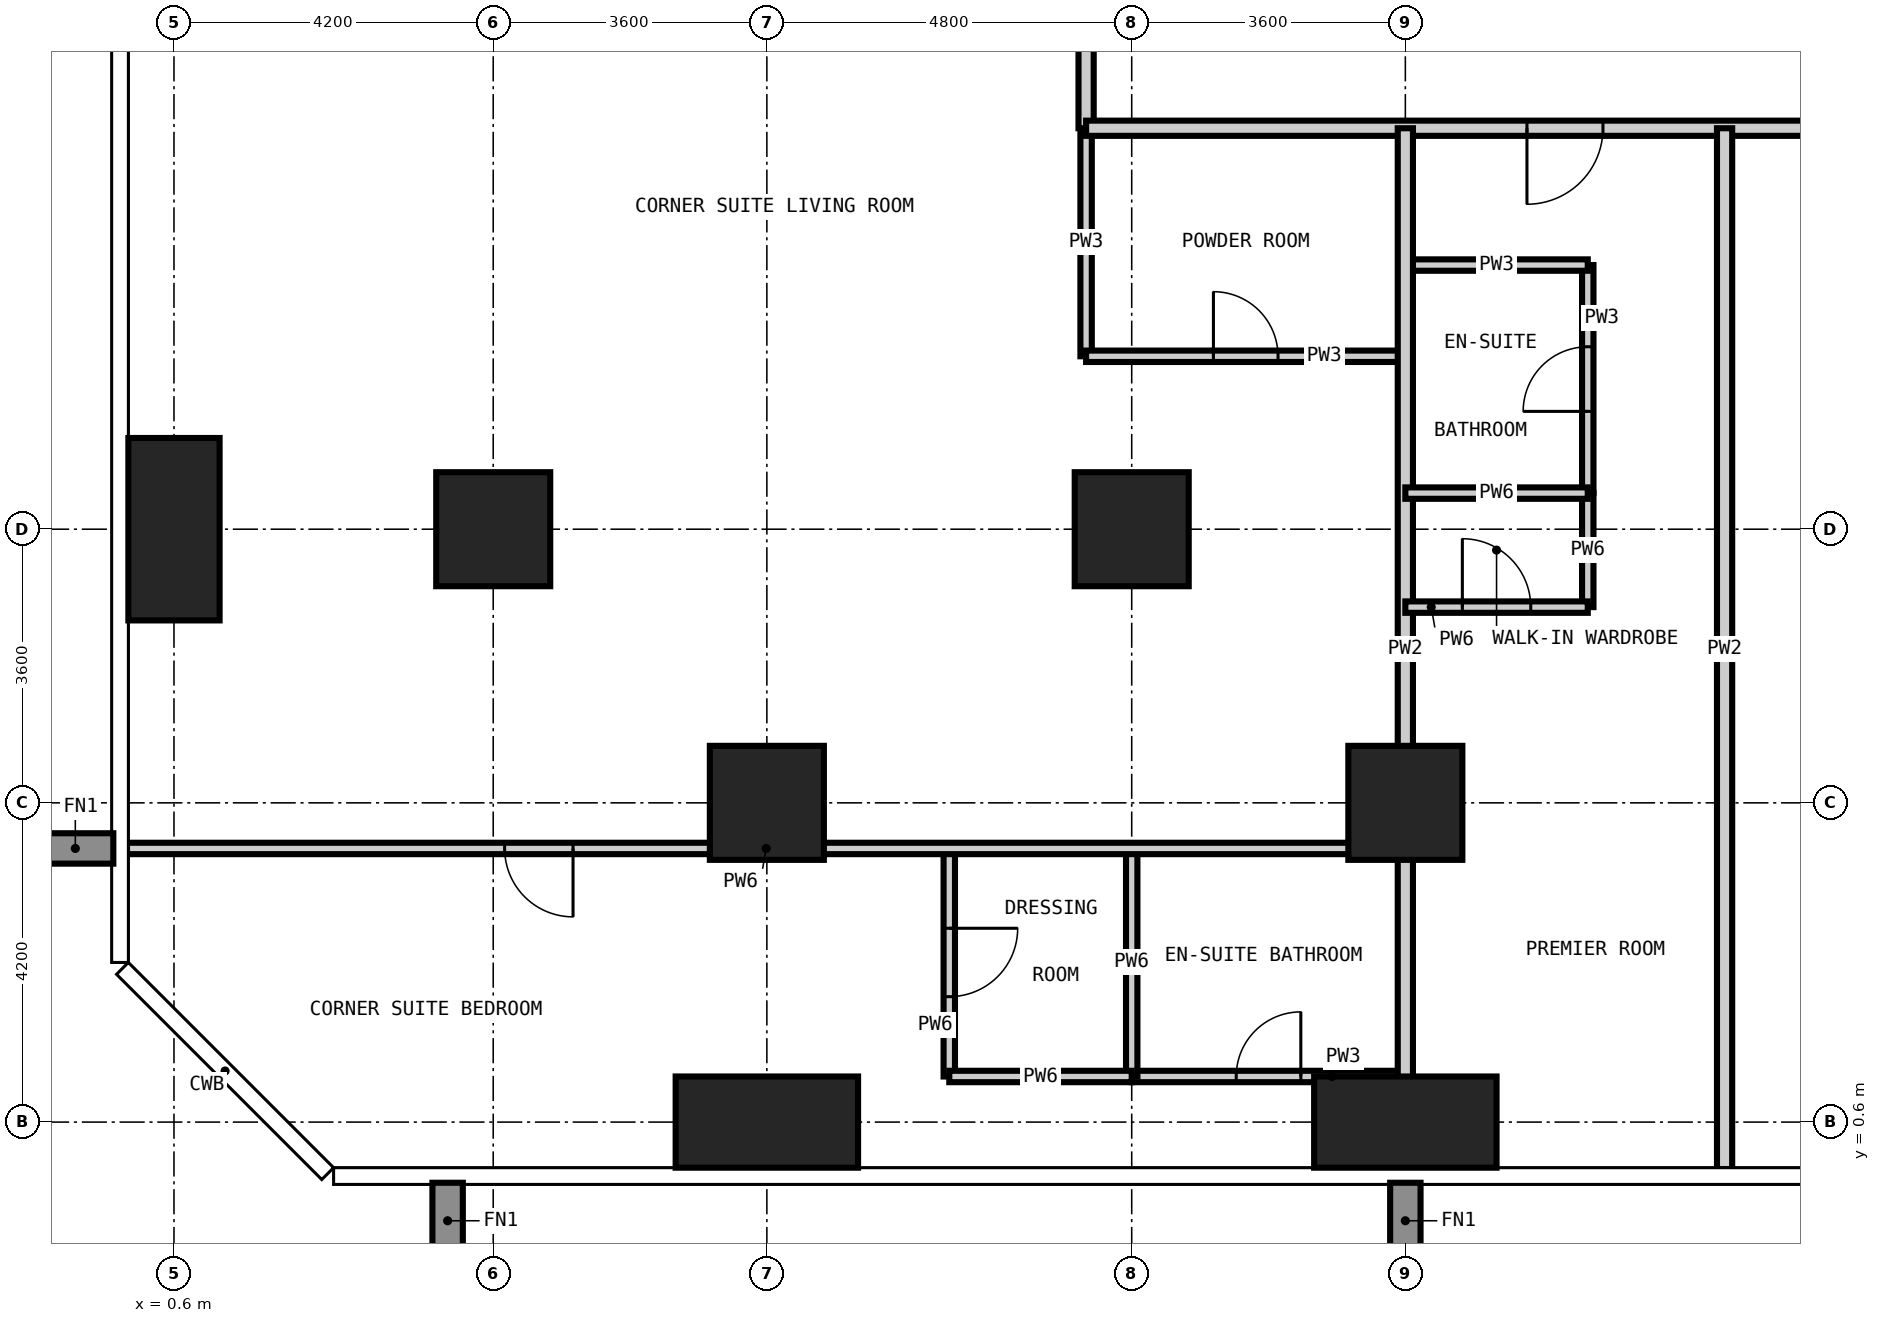
"""IFC4 building model, lengths in metres.
Left out: names, types, materials, properties, quantities, classifications, styles, units other than length and angle.
Written with IfcOpenShell. Run it as: python <this file> out.ifc"""

import sys

from ifc_helpers import new_model, si_unit, direction, frame, frame_2d, origin, origin_2d, place, context, subcontext, project, spatial, rectangle, extrude, element, fill, save


model = new_model("IFC4")
c1 = context("Model", 3, precision=1e-05, world=origin(), true_north=direction((0.0, 1.0)))
c2 = subcontext(c1, "Body", "Model", "MODEL_VIEW")
j1 = project(units=[si_unit("LENGTHUNIT", "METRE"), si_unit("PLANEANGLEUNIT", "RADIAN")], contexts=[c1])
p1 = place(None, origin())
s1 = spatial("IfcSite", under=j1, at=p1, CompositionType="ELEMENT")
p2 = place(p1, origin())
s2 = spatial("IfcBuilding", under=s1, at=p2, CompositionType="ELEMENT")
p3 = place(p2, frame((0.0, 0.0, 122.4)))
s3 = spatial("IfcBuildingStorey", under=s2, at=p3, CompositionType="ELEMENT", Elevation=122.4)
p4 = place(p3, frame((0.6, 8.4, -0.35), z_axis=(0.0, 0.0, 1.0), x_axis=(1.0, 0.0, 0.0)))
e1 = element("IfcColumn", 1, at=p4, inside=s3, PredefinedType="COLUMN", context=c2, shape_type="SweptSolid", body=[
    extrude(rectangle(XDim=1.2, YDim=2.4, at=origin_2d()), origin(), (0.0, 0.0, 1.0), 3.6),
])
p5 = place(p3, frame((4.8, 8.4, -0.35), z_axis=(0.0, 0.0, 1.0), x_axis=(1.0, 0.0, 0.0)))
e2 = element("IfcColumn", 2, at=p5, inside=s3, PredefinedType="COLUMN", context=c2, shape_type="SweptSolid", body=[
    extrude(rectangle(XDim=1.5, YDim=1.5, at=origin_2d()), origin(), (0.0, 0.0, 1.0), 3.6),
])
p6 = place(p3, frame((8.4, 0.6, -0.35), z_axis=(0.0, 0.0, 1.0), x_axis=(1.0, 0.0, 0.0)))
e3 = element("IfcColumn", 3, at=p6, inside=s3, PredefinedType="COLUMN", context=c2, shape_type="SweptSolid", body=[
    extrude(rectangle(XDim=2.4, YDim=1.2, at=origin_2d()), origin(), (0.0, 0.0, 1.0), 3.6),
])
for number, where, z_axis, x_axis in (
    (4, (8.4, 4.8, -0.35), (0.0, 0.0, 1.0), (1.0, 0.0, 0.0)),
    (5, (13.2, 8.4, -0.35), (0.0, 0.0, 1.0), (1.0, 0.0, 0.0)),
):
    element("IfcColumn", number, at=place(p3, frame(where, z_axis=z_axis, x_axis=x_axis)), inside=s3, PredefinedType="COLUMN", context=c2, shape_type="SweptSolid", body=[
        extrude(rectangle(XDim=1.5, YDim=1.5, at=origin_2d()), origin(), (0.0, 0.0, 1.0), 3.6),
    ])
p7 = place(p3, frame((16.8, 0.6, -0.35), z_axis=(0.0, 0.0, 1.0), x_axis=(1.0, 0.0, 0.0)))
e6 = element("IfcColumn", 6, at=p7, inside=s3, PredefinedType="COLUMN", context=c2, shape_type="SweptSolid", body=[
    extrude(rectangle(XDim=2.4, YDim=1.2, at=origin_2d()), origin(), (0.0, 0.0, 1.0), 3.6),
])
p8 = place(p3, frame((16.8, 4.8, -0.35), z_axis=(0.0, 0.0, 1.0), x_axis=(1.0, 0.0, 0.0)))
e7 = element("IfcColumn", 7, at=p8, inside=s3, PredefinedType="COLUMN", context=c2, shape_type="SweptSolid", body=[
    extrude(rectangle(XDim=1.5, YDim=1.5, at=origin_2d()), origin(), (0.0, 0.0, 1.0), 3.6),
])
p9 = place(p3, frame((12.6, 10.675, 0.0), z_axis=(0.0, 0.0, 1.0), x_axis=(0.0, 1.0, 0.0)))
e8 = element("IfcWall", 8, at=p9, inside=s3, PredefinedType="PARTITIONING", context=c2, shape_type="SweptSolid", body=[
    extrude(rectangle(XDim=3.0, YDim=0.15, at=frame_2d((1.5, 0.0))), origin(), (0.0, 0.0, 1.0), 3.25),
])
p10 = place(p3, frame((19.2, 8.875, 0.0), z_axis=(0.0, 0.0, 1.0), x_axis=(0.0, 1.0, 0.0)))
e9 = element("IfcWall", 9, at=p10, inside=s3, PredefinedType="PARTITIONING", context=c2, shape_type="SweptSolid", body=[
    extrude(rectangle(XDim=3.0, YDim=0.15, at=frame_2d((1.5, 0.0))), origin(), (0.0, 0.0, 1.0), 3.25),
])
p11 = place(p10, frame((1.075, 0.0, 0.0)))
e10 = element("IfcOpeningElement", 10, at=p11, cuts=e9, PredefinedType="OPENING", context=c2, shape_type="SweptSolid", body=[
    extrude(rectangle(XDim=0.85, YDim=2.1, at=frame_2d((0.425, 1.05))), frame((0.0, 0.085, 0.0), z_axis=(0.0, -1.0, 0.0), x_axis=(1.0, 0.0, 0.0)), (0.0, 0.0, 1.0), 0.17),
])
p12 = place(p3, frame((13.2, 1.2, 0.0), z_axis=(0.0, 0.0, 1.0), x_axis=(1.0, 0.0, 0.0)))
e11 = element("IfcWall", 11, at=p12, inside=s3, PredefinedType="PARTITIONING", context=c2, shape_type="SweptSolid", body=[
    extrude(rectangle(XDim=3.6, YDim=0.15, at=frame_2d((1.8, 0.0))), origin(), (0.0, 0.0, 1.0), 3.25),
])
p13 = place(p12, frame((1.375, 0.0, 0.0)))
e12 = element("IfcOpeningElement", 12, at=p13, cuts=e11, PredefinedType="OPENING", context=c2, shape_type="SweptSolid", body=[
    extrude(rectangle(XDim=0.85, YDim=2.1, at=frame_2d((0.425, 1.05))), frame((0.0, 0.085, 0.0), z_axis=(0.0, -1.0, 0.0), x_axis=(1.0, 0.0, 0.0)), (0.0, 0.0, 1.0), 0.17),
])
p14 = place(p3, frame((12.6, 10.675, 0.0), z_axis=(0.0, 0.0, 1.0), x_axis=(1.0, 0.0, 0.0)))
e13 = element("IfcWall", 13, at=p14, inside=s3, PredefinedType="PARTITIONING", context=c2, shape_type="SweptSolid", body=[
    extrude(rectangle(XDim=4.2, YDim=0.15, at=frame_2d((2.1, 0.0))), origin(), (0.0, 0.0, 1.0), 3.25),
])
p15 = place(p14, frame((1.675, 0.0, 0.0)))
e14 = element("IfcOpeningElement", 14, at=p15, cuts=e13, PredefinedType="OPENING", context=c2, shape_type="SweptSolid", body=[
    extrude(rectangle(XDim=0.85, YDim=2.1, at=frame_2d((0.425, 1.05))), frame((0.0, 0.085, 0.0), z_axis=(0.0, -1.0, 0.0), x_axis=(1.0, 0.0, 0.0)), (0.0, 0.0, 1.0), 0.17),
])
p16 = place(p3, frame((16.8, 11.875, 0.0), z_axis=(0.0, 0.0, 1.0), x_axis=(1.0, 0.0, 0.0)))
e15 = element("IfcWall", 15, at=p16, inside=s3, PredefinedType="PARTITIONING", context=c2, shape_type="SweptSolid", body=[
    extrude(rectangle(XDim=2.4, YDim=0.15, at=frame_2d((1.2, 0.0))), origin(), (0.0, 0.0, 1.0), 3.25),
])
p17 = place(p3, frame((12.6, 13.675, 0.0), z_axis=(0.0, 0.0, 1.0), x_axis=(0.0, 1.0, 0.0)))
e16 = element("IfcWall", 16, at=p17, inside=s3, PredefinedType="PARTITIONING", context=c2, shape_type="SweptSolid", body=[
    extrude(rectangle(XDim=32.05, YDim=0.2, at=frame_2d((16.025, 0.0))), origin(), (0.0, 0.0, 1.0), 3.25),
])
p18 = place(p17, frame((6.825, 0.0, 0.0)))
e17 = element("IfcOpeningElement", 17, at=p18, cuts=e16, PredefinedType="OPENING", context=c2, shape_type="SweptSolid", body=[
    extrude(rectangle(XDim=1.0, YDim=2.2, at=frame_2d((0.5, 1.1))), frame((0.0, 0.11, 0.0), z_axis=(0.0, -1.0, 0.0), x_axis=(1.0, 0.0, 0.0)), (0.0, 0.0, 1.0), 0.22),
])
p19 = place(p17, frame((15.225, 0.0, 0.0)))
e18 = element("IfcOpeningElement", 18, at=p19, cuts=e16, PredefinedType="OPENING", context=c2, shape_type="SweptSolid", body=[
    extrude(rectangle(XDim=1.0, YDim=2.2, at=frame_2d((0.5, 1.1))), frame((0.0, 0.11, 0.0), z_axis=(0.0, -1.0, 0.0), x_axis=(1.0, 0.0, 0.0)), (0.0, 0.0, 1.0), 0.22),
])
p20 = place(p17, frame((23.625, 0.0, 0.0)))
e19 = element("IfcOpeningElement", 19, at=p20, cuts=e16, PredefinedType="OPENING", context=c2, shape_type="SweptSolid", body=[
    extrude(rectangle(XDim=1.0, YDim=2.2, at=frame_2d((0.5, 1.1))), frame((0.0, 0.11, 0.0), z_axis=(0.0, -1.0, 0.0), x_axis=(1.0, 0.0, 0.0)), (0.0, 0.0, 1.0), 0.22),
])
p21 = place(p17, frame((1.063, 0.0, 0.0)))
e20 = element("IfcOpeningElement", 20, at=p21, cuts=e16, PredefinedType="OPENING", context=c2, shape_type="SweptSolid", body=[
    extrude(rectangle(XDim=1.0, YDim=2.2, at=frame_2d((0.5, 1.1))), frame((0.0, 0.11, 0.0), z_axis=(0.0, -1.0, 0.0), x_axis=(1.0, 0.0, 0.0)), (0.0, 0.0, 1.0), 0.22),
])
p22 = place(p17, frame((29.687, 0.0, 0.0)))
e21 = element("IfcOpeningElement", 21, at=p22, cuts=e16, PredefinedType="OPENING", context=c2, shape_type="SweptSolid", body=[
    extrude(rectangle(XDim=1.0, YDim=2.2, at=frame_2d((0.5, 1.1))), frame((0.0, 0.11, 0.0), z_axis=(0.0, -1.0, 0.0), x_axis=(1.0, 0.0, 0.0)), (0.0, 0.0, 1.0), 0.22),
])
p23 = place(p3, frame((44.525, 13.675, 0.0), z_axis=(0.0, 0.0, 1.0), x_axis=(-1.0, 0.0, 0.0)))
e22 = element("IfcWall", 22, at=p23, inside=s3, PredefinedType="PARTITIONING", context=c2, shape_type="SweptSolid", body=[
    extrude(rectangle(XDim=31.925, YDim=0.2, at=frame_2d((15.962, 0.0))), origin(), (0.0, 0.0, 1.0), 3.25),
])
p24 = place(p23, frame((25.125, 0.0, 0.0)))
e23 = element("IfcOpeningElement", 23, at=p24, cuts=e22, PredefinedType="OPENING", context=c2, shape_type="SweptSolid", body=[
    extrude(rectangle(XDim=1.0, YDim=2.2, at=frame_2d((0.5, 1.1))), frame((0.0, 0.11, 0.0), z_axis=(0.0, -1.0, 0.0), x_axis=(1.0, 0.0, 0.0)), (0.0, 0.0, 1.0), 0.22),
])
p25 = place(p23, frame((18.825, 0.0, 0.0)))
e24 = element("IfcOpeningElement", 24, at=p25, cuts=e22, PredefinedType="OPENING", context=c2, shape_type="SweptSolid", body=[
    extrude(rectangle(XDim=1.0, YDim=2.2, at=frame_2d((0.5, 1.1))), frame((0.0, 0.11, 0.0), z_axis=(0.0, -1.0, 0.0), x_axis=(1.0, 0.0, 0.0)), (0.0, 0.0, 1.0), 0.22),
])
p26 = place(p23, frame((10.425, 0.0, 0.0)))
e25 = element("IfcOpeningElement", 25, at=p26, cuts=e22, PredefinedType="OPENING", context=c2, shape_type="SweptSolid", body=[
    extrude(rectangle(XDim=1.0, YDim=2.2, at=frame_2d((0.5, 1.1))), frame((0.0, 0.11, 0.0), z_axis=(0.0, -1.0, 0.0), x_axis=(1.0, 0.0, 0.0)), (0.0, 0.0, 1.0), 0.22),
])
p27 = place(p23, frame((4.125, 0.0, 0.0)))
e26 = element("IfcOpeningElement", 26, at=p27, cuts=e22, PredefinedType="OPENING", context=c2, shape_type="SweptSolid", body=[
    extrude(rectangle(XDim=1.0, YDim=2.2, at=frame_2d((0.5, 1.1))), frame((0.0, 0.11, 0.0), z_axis=(0.0, -1.0, 0.0), x_axis=(1.0, 0.0, 0.0)), (0.0, 0.0, 1.0), 0.22),
])
for number, where, z_axis, x_axis in (
    (27, (16.8, -0.018, 0.0), (0.0, 0.0, 1.0), (0.0, 1.0, 0.0)),
    (28, (21.0, -0.018, 0.0), (0.0, 0.0, 1.0), (0.0, 1.0, 0.0)),
):
    element("IfcWall", number, at=place(p3, frame(where, z_axis=z_axis, x_axis=x_axis)), inside=s3, PredefinedType="PARTITIONING", context=c2, shape_type="SweptSolid", body=[
        extrude(rectangle(XDim=13.693, YDim=0.2, at=frame_2d((6.847, 0.0))), origin(), (0.0, 0.0, 1.0), 3.25),
    ])
p28 = place(p3, frame((10.8, 1.2, 0.0), z_axis=(0.0, 0.0, 1.0), x_axis=(0.0, 1.0, 0.0)))
e29 = element("IfcWall", 29, at=p28, inside=s3, PredefinedType="PARTITIONING", context=c2, shape_type="SweptSolid", body=[
    extrude(rectangle(XDim=3.0, YDim=0.15, at=frame_2d((1.5, 0.0))), origin(), (0.0, 0.0, 1.0), 3.25),
])
p29 = place(p28, frame((1.05, 0.0, 0.0)))
e30 = element("IfcOpeningElement", 30, at=p29, cuts=e29, PredefinedType="OPENING", context=c2, shape_type="SweptSolid", body=[
    extrude(rectangle(XDim=0.9, YDim=2.1, at=frame_2d((0.45, 1.05))), frame((0.0, 0.085, 0.0), z_axis=(0.0, -1.0, 0.0), x_axis=(1.0, 0.0, 0.0)), (0.0, 0.0, 1.0), 0.17),
])
p30 = place(p3, frame((13.2, 1.2, 0.0), z_axis=(0.0, 0.0, 1.0), x_axis=(0.0, 1.0, 0.0)))
e31 = element("IfcWall", 31, at=p30, inside=s3, PredefinedType="PARTITIONING", context=c2, shape_type="SweptSolid", body=[
    extrude(rectangle(XDim=3.0, YDim=0.15, at=frame_2d((1.5, 0.0))), origin(), (0.0, 0.0, 1.0), 3.25),
])
p31 = place(p3, frame((19.2, 7.375, 0.0), z_axis=(0.0, 0.0, 1.0), x_axis=(0.0, 1.0, 0.0)))
e32 = element("IfcWall", 32, at=p31, inside=s3, PredefinedType="PARTITIONING", context=c2, shape_type="SweptSolid", body=[
    extrude(rectangle(XDim=1.5, YDim=0.15, at=frame_2d((0.75, 0.0))), origin(), (0.0, 0.0, 1.0), 3.25),
])
p32 = place(p3, frame((10.8, 1.2, 0.0), z_axis=(0.0, 0.0, 1.0), x_axis=(1.0, 0.0, 0.0)))
e33 = element("IfcWall", 33, at=p32, inside=s3, PredefinedType="PARTITIONING", context=c2, shape_type="SweptSolid", body=[
    extrude(rectangle(XDim=2.4, YDim=0.15, at=frame_2d((1.2, 0.0))), origin(), (0.0, 0.0, 1.0), 3.25),
])
p33 = place(p3, frame((-0.018, 4.2, 0.0), z_axis=(0.0, 0.0, 1.0), x_axis=(1.0, 0.0, 0.0)))
e34 = element("IfcWall", 34, at=p33, inside=s3, PredefinedType="PARTITIONING", context=c2, shape_type="SweptSolid", body=[
    extrude(rectangle(XDim=16.818, YDim=0.15, at=frame_2d((8.409, 0.0))), origin(), (0.0, 0.0, 1.0), 3.25),
])
p34 = place(p33, frame((4.968, 0.0, 0.0)))
e35 = element("IfcOpeningElement", 35, at=p34, cuts=e34, PredefinedType="OPENING", context=c2, shape_type="SweptSolid", body=[
    extrude(rectangle(XDim=0.9, YDim=2.1, at=frame_2d((0.45, 1.05))), frame((0.0, 0.085, 0.0), z_axis=(0.0, -1.0, 0.0), x_axis=(1.0, 0.0, 0.0)), (0.0, 0.0, 1.0), 0.17),
])
p35 = place(p3, frame((16.8, 7.375, 0.0), z_axis=(0.0, 0.0, 1.0), x_axis=(1.0, 0.0, 0.0)))
e36 = element("IfcWall", 36, at=p35, inside=s3, PredefinedType="PARTITIONING", context=c2, shape_type="SweptSolid", body=[
    extrude(rectangle(XDim=2.4, YDim=0.15, at=frame_2d((1.2, 0.0))), origin(), (0.0, 0.0, 1.0), 3.25),
])
p36 = place(p35, frame((0.75, 0.0, 0.0)))
e37 = element("IfcOpeningElement", 37, at=p36, cuts=e36, PredefinedType="OPENING", context=c2, shape_type="SweptSolid", body=[
    extrude(rectangle(XDim=0.9, YDim=2.1, at=frame_2d((0.45, 1.05))), frame((0.0, 0.085, 0.0), z_axis=(0.0, -1.0, 0.0), x_axis=(1.0, 0.0, 0.0)), (0.0, 0.0, 1.0), 0.17),
])
p37 = place(p3, frame((16.8, 8.875, 0.0), z_axis=(0.0, 0.0, 1.0), x_axis=(1.0, 0.0, 0.0)))
e38 = element("IfcWall", 38, at=p37, inside=s3, PredefinedType="PARTITIONING", context=c2, shape_type="SweptSolid", body=[
    extrude(rectangle(XDim=2.4, YDim=0.15, at=frame_2d((1.2, 0.0))), origin(), (0.0, 0.0, 1.0), 3.25),
])
p38 = place(p24, origin())
e39 = element("IfcDoor", 39, at=p38, inside=s3, OperationType="SINGLE_SWING_RIGHT", PredefinedType="DOOR", context=c2, shape_type="SweptSolid", body=[
    extrude(rectangle(XDim=1.0, YDim=2.2, at=frame_2d((0.5, 1.1))), frame((0.0, 0.025, 0.0), z_axis=(0.0, -1.0, 0.0), x_axis=(1.0, 0.0, 0.0)), (0.0, 0.0, 1.0), 0.05),
])
fill(e23, e39)
p39 = place(p11, origin())
e40 = element("IfcDoor", 40, at=p39, inside=s3, OperationType="SINGLE_SWING_LEFT", PredefinedType="DOOR", context=c2, shape_type="SweptSolid", body=[
    extrude(rectangle(XDim=0.85, YDim=2.1, at=frame_2d((0.425, 1.05))), frame((0.0, 0.025, 0.0), z_axis=(0.0, -1.0, 0.0), x_axis=(1.0, 0.0, 0.0)), (0.0, 0.0, 1.0), 0.05),
])
fill(e10, e40)
p40 = place(p36, origin())
e41 = element("IfcDoor", 41, at=p40, inside=s3, OperationType="SINGLE_SWING_LEFT", PredefinedType="DOOR", context=c2, shape_type="SweptSolid", body=[
    extrude(rectangle(XDim=0.9, YDim=2.1, at=frame_2d((0.45, 1.05))), frame((0.0, 0.025, 0.0), z_axis=(0.0, -1.0, 0.0), x_axis=(1.0, 0.0, 0.0)), (0.0, 0.0, 1.0), 0.05),
])
fill(e37, e41)
p41 = place(p15, origin())
e42 = element("IfcDoor", 42, at=p41, inside=s3, OperationType="SINGLE_SWING_LEFT", PredefinedType="DOOR", context=c2, shape_type="SweptSolid", body=[
    extrude(rectangle(XDim=0.85, YDim=2.1, at=frame_2d((0.425, 1.05))), frame((0.0, 0.025, 0.0), z_axis=(0.0, -1.0, 0.0), x_axis=(1.0, 0.0, 0.0)), (0.0, 0.0, 1.0), 0.05),
])
fill(e14, e42)
p42 = place(p34, frame((0.9, 0.0, 0.0), z_axis=(0.0, 0.0, 1.0), x_axis=(-1.0, 0.0, 0.0)))
e43 = element("IfcDoor", 43, at=p42, inside=s3, OperationType="SINGLE_SWING_LEFT", PredefinedType="DOOR", context=c2, shape_type="SweptSolid", body=[
    extrude(rectangle(XDim=0.9, YDim=2.1, at=frame_2d((0.45, 1.05))), frame((0.0, 0.025, 0.0), z_axis=(0.0, -1.0, 0.0), x_axis=(1.0, 0.0, 0.0)), (0.0, 0.0, 1.0), 0.05),
])
fill(e35, e43)
p43 = place(p13, origin())
e44 = element("IfcDoor", 44, at=p43, inside=s3, OperationType="SINGLE_SWING_RIGHT", PredefinedType="DOOR", context=c2, shape_type="SweptSolid", body=[
    extrude(rectangle(XDim=0.85, YDim=2.1, at=frame_2d((0.425, 1.05))), frame((0.0, 0.025, 0.0), z_axis=(0.0, -1.0, 0.0), x_axis=(1.0, 0.0, 0.0)), (0.0, 0.0, 1.0), 0.05),
])
fill(e12, e44)
p44 = place(p29, frame((0.9, 0.0, 0.0), z_axis=(0.0, 0.0, 1.0), x_axis=(-1.0, 0.0, 0.0)))
e45 = element("IfcDoor", 45, at=p44, inside=s3, OperationType="SINGLE_SWING_LEFT", PredefinedType="DOOR", context=c2, shape_type="SweptSolid", body=[
    extrude(rectangle(XDim=0.9, YDim=2.1, at=frame_2d((0.45, 1.05))), frame((0.0, 0.025, 0.0), z_axis=(0.0, -1.0, 0.0), x_axis=(1.0, 0.0, 0.0)), (0.0, 0.0, 1.0), 0.05),
])
fill(e30, e45)
save(model, sys.argv[1])
